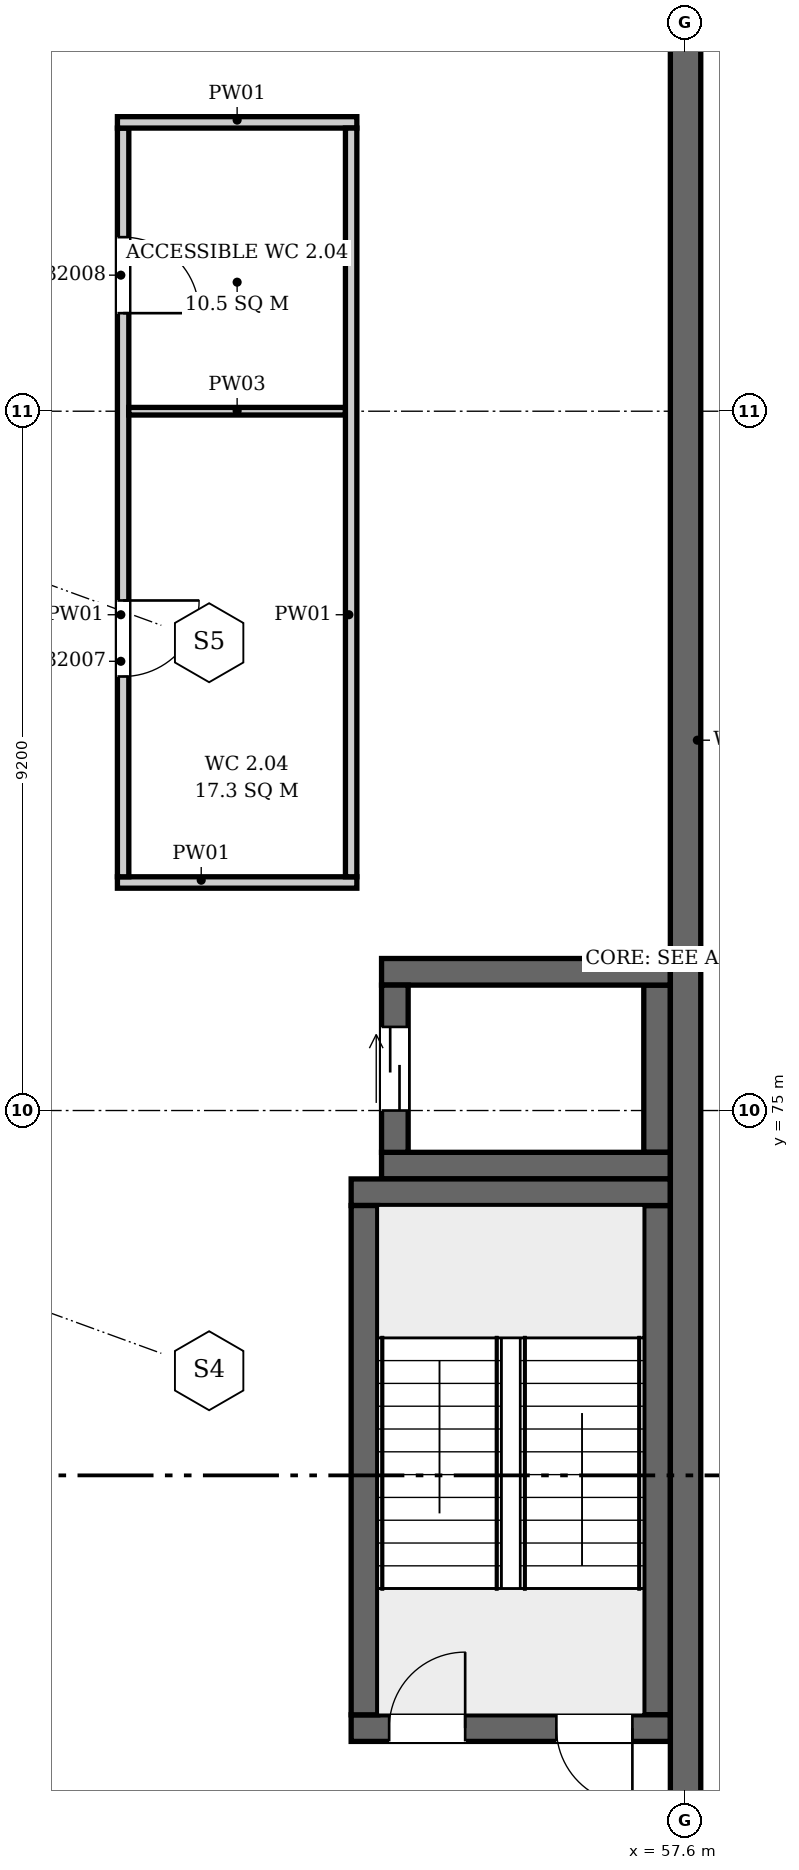
"""IFC4 building model, lengths in metres.
Left out: names, types, materials, properties, quantities, classifications, styles, units other than length and angle.
Written with IfcOpenShell. Run it as: python <this file> out.ifc"""

import sys

from ifc_helpers import new_model, si_unit, direction, frame, frame_2d, origin, place, context, subcontext, project, spatial, rectangle, extrude, element, fill, save


model = new_model("IFC4")
c1 = context("Model", 3, precision=1e-05, world=origin(), true_north=direction((0.0, 1.0)))
c2 = subcontext(c1, "Body", "Model", "MODEL_VIEW")
j1 = project(units=[si_unit("LENGTHUNIT", "METRE"), si_unit("PLANEANGLEUNIT", "RADIAN")], contexts=[c1])
p1 = place(None, origin())
s1 = spatial("IfcSite", under=j1, at=p1, CompositionType="ELEMENT")
p2 = place(p1, origin())
s2 = spatial("IfcBuilding", under=s1, at=p2, CompositionType="ELEMENT")
p3 = place(p2, frame((0.0, 0.0, 14.2)))
s3 = spatial("IfcBuildingStorey", under=s2, at=p3, CompositionType="ELEMENT", Elevation=14.2)
p4 = place(p3, frame((57.6, 46.72, 0.0), z_axis=(0.0, 0.0, 1.0), x_axis=(0.0, 1.0, 0.0)))
e1 = element("IfcWall", 1, at=p4, inside=s3, PredefinedType="SHEAR", context=c2, shape_type="SweptSolid", body=[
    extrude(rectangle(XDim=47.36, YDim=0.4, at=frame_2d((23.68, 0.0))), origin(), (0.0, 0.0, 1.0), 7.5),
])
p5 = place(p3, frame((53.2, 66.875, 0.0), z_axis=(0.0, 0.0, 1.0), x_axis=(1.0, 0.0, 0.0)))
e2 = element("IfcWall", 2, at=p5, inside=s3, PredefinedType="SHEAR", context=c2, shape_type="SweptSolid", body=[
    extrude(rectangle(XDim=4.2, YDim=0.35, at=frame_2d((2.1, 0.0))), origin(), (0.0, 0.0, 1.0), 7.5),
])
p6 = place(p5, frame((0.5, 0.0, 0.0)))
e3 = element("IfcOpeningElement", 3, at=p6, cuts=e2, PredefinedType="OPENING", context=c2, shape_type="SweptSolid", body=[
    extrude(rectangle(XDim=1.0, YDim=2.1, at=frame_2d((0.5, 1.05))), frame((0.0, 0.185, 0.0), z_axis=(0.0, -1.0, 0.0), x_axis=(1.0, 0.0, 0.0)), (0.0, 0.0, 1.0), 0.37),
])
p7 = place(p5, frame((2.7, 0.0, 0.0)))
e4 = element("IfcOpeningElement", 4, at=p7, cuts=e2, PredefinedType="OPENING", context=c2, shape_type="SweptSolid", body=[
    extrude(rectangle(XDim=1.0, YDim=2.1, at=frame_2d((0.5, 1.05))), frame((0.0, 0.185, 0.0), z_axis=(0.0, -1.0, 0.0), x_axis=(1.0, 0.0, 0.0)), (0.0, 0.0, 1.0), 0.37),
])
p8 = place(p3, frame((53.2, 73.925, 0.0), z_axis=(0.0, 0.0, 1.0), x_axis=(1.0, 0.0, 0.0)))
e5 = element("IfcWall", 5, at=p8, inside=s3, PredefinedType="SHEAR", context=c2, shape_type="SweptSolid", body=[
    extrude(rectangle(XDim=4.2, YDim=0.35, at=frame_2d((2.1, 0.0))), origin(), (0.0, 0.0, 1.0), 7.5),
])
for number, where, z_axis, x_axis in (
    (6, (53.375, 67.05, 0.0), (0.0, 0.0, 1.0), (0.0, 1.0, 0.0)),
    (7, (57.225, 67.05, 0.0), (0.0, 0.0, 1.0), (0.0, 1.0, 0.0)),
):
    element("IfcWall", number, at=place(p3, frame(where, z_axis=z_axis, x_axis=x_axis)), inside=s3, PredefinedType="SHEAR", context=c2, shape_type="SweptSolid", body=[
        extrude(rectangle(XDim=6.7, YDim=0.35, at=frame_2d((3.35, 0.0))), origin(), (0.0, 0.0, 1.0), 7.5),
    ])
for number, where, z_axis, x_axis in (
    (8, (53.6, 74.275, 0.0), (0.0, 0.0, 1.0), (1.0, 0.0, 0.0)),
    (9, (53.6, 76.825, 0.0), (0.0, 0.0, 1.0), (1.0, 0.0, 0.0)),
):
    element("IfcWall", number, at=place(p3, frame(where, z_axis=z_axis, x_axis=x_axis)), inside=s3, PredefinedType="SHEAR", context=c2, shape_type="SweptSolid", body=[
        extrude(rectangle(XDim=3.8, YDim=0.35, at=frame_2d((1.9, 0.0))), origin(), (0.0, 0.0, 1.0), 7.5),
    ])
p9 = place(p3, frame((53.775, 74.45, 0.0), z_axis=(0.0, 0.0, 1.0), x_axis=(0.0, 1.0, 0.0)))
e10 = element("IfcWall", 10, at=p9, inside=s3, PredefinedType="SHEAR", context=c2, shape_type="SweptSolid", body=[
    extrude(rectangle(XDim=2.2, YDim=0.35, at=frame_2d((1.1, 0.0))), origin(), (0.0, 0.0, 1.0), 7.5),
])
p10 = place(p9, frame((0.55, 0.0, 0.0)))
e11 = element("IfcOpeningElement", 11, at=p10, cuts=e10, PredefinedType="OPENING", context=c2, shape_type="SweptSolid", body=[
    extrude(rectangle(XDim=1.1, YDim=2.1, at=frame_2d((0.55, 1.05))), frame((0.0, 0.185, 0.0), z_axis=(0.0, -1.0, 0.0), x_axis=(1.0, 0.0, 0.0)), (0.0, 0.0, 1.0), 0.37),
])
p11 = place(p3, frame((57.225, 74.45, 0.0), z_axis=(0.0, 0.0, 1.0), x_axis=(0.0, 1.0, 0.0)))
e12 = element("IfcWall", 12, at=p11, inside=s3, PredefinedType="SHEAR", context=c2, shape_type="SweptSolid", body=[
    extrude(rectangle(XDim=2.2, YDim=0.35, at=frame_2d((1.1, 0.0))), origin(), (0.0, 0.0, 1.0), 7.5),
])
p12 = place(p3, frame((50.125, 78.0, 0.0), z_axis=(0.0, 0.0, 1.0), x_axis=(1.0, 0.0, 0.0)))
e13 = element("IfcWall", 13, at=p12, inside=s3, PredefinedType="PARTITIONING", context=c2, shape_type="SweptSolid", body=[
    extrude(rectangle(XDim=3.15, YDim=0.15, at=frame_2d((1.575, 0.0))), origin(), (0.0, 0.0, 1.0), 7.15),
])
p13 = place(p3, frame((50.2, 78.075, 0.0), z_axis=(0.0, 0.0, 1.0), x_axis=(0.0, 1.0, 0.0)))
e14 = element("IfcWall", 14, at=p13, inside=s3, PredefinedType="PARTITIONING", context=c2, shape_type="SweptSolid", body=[
    extrude(rectangle(XDim=9.85, YDim=0.15, at=frame_2d((4.925, 0.0))), origin(), (0.0, 0.0, 1.0), 7.15),
])
p14 = place(p13, frame((2.635, 0.0, 0.0)))
e15 = element("IfcOpeningElement", 15, at=p14, cuts=e14, PredefinedType="OPENING", context=c2, shape_type="SweptSolid", body=[
    extrude(rectangle(XDim=1.0, YDim=2.1, at=frame_2d((0.5, 1.05))), frame((0.0, 0.085, 0.0), z_axis=(0.0, -1.0, 0.0), x_axis=(1.0, 0.0, 0.0)), (0.0, 0.0, 1.0), 0.17),
])
p15 = place(p13, frame((7.415, 0.0, 0.0)))
e16 = element("IfcOpeningElement", 16, at=p15, cuts=e14, PredefinedType="OPENING", context=c2, shape_type="SweptSolid", body=[
    extrude(rectangle(XDim=1.0, YDim=2.1, at=frame_2d((0.5, 1.05))), frame((0.0, 0.085, 0.0), z_axis=(0.0, -1.0, 0.0), x_axis=(1.0, 0.0, 0.0)), (0.0, 0.0, 1.0), 0.17),
])
p16 = place(p3, frame((50.125, 88.0, 0.0), z_axis=(0.0, 0.0, 1.0), x_axis=(1.0, 0.0, 0.0)))
e17 = element("IfcWall", 17, at=p16, inside=s3, PredefinedType="PARTITIONING", context=c2, shape_type="SweptSolid", body=[
    extrude(rectangle(XDim=3.15, YDim=0.15, at=frame_2d((1.575, 0.0))), origin(), (0.0, 0.0, 1.0), 7.15),
])
p17 = place(p3, frame((50.275, 84.2, 0.0), z_axis=(0.0, 0.0, 1.0), x_axis=(1.0, 0.0, 0.0)))
e18 = element("IfcWall", 18, at=p17, inside=s3, PredefinedType="PARTITIONING", context=c2, shape_type="SweptSolid", body=[
    extrude(rectangle(XDim=2.85, YDim=0.1, at=frame_2d((1.425, 0.0))), origin(), (0.0, 0.0, 1.0), 6.75),
])
p18 = place(p3, frame((53.2, 78.075, 0.0), z_axis=(0.0, 0.0, 1.0), x_axis=(0.0, 1.0, 0.0)))
e19 = element("IfcWall", 19, at=p18, inside=s3, PredefinedType="PARTITIONING", context=c2, shape_type="SweptSolid", body=[
    extrude(rectangle(XDim=9.85, YDim=0.15, at=frame_2d((4.925, 0.0))), origin(), (0.0, 0.0, 1.0), 7.15),
])
p19 = place(p6, origin())
e20 = element("IfcDoor", 20, at=p19, inside=s3, OperationType="SINGLE_SWING_RIGHT", PredefinedType="DOOR", context=c2, shape_type="SweptSolid", body=[
    extrude(rectangle(XDim=1.0, YDim=2.1, at=frame_2d((0.5, 1.05))), frame((0.0, 0.025, 0.0), z_axis=(0.0, -1.0, 0.0), x_axis=(1.0, 0.0, 0.0)), (0.0, 0.0, 1.0), 0.05),
])
fill(e3, e20)
p20 = place(p7, origin())
e21 = element("IfcDoor", 21, at=p20, inside=s3, OperationType="SINGLE_SWING_LEFT", PredefinedType="DOOR", context=c2, shape_type="SweptSolid", body=[
    extrude(rectangle(XDim=1.0, YDim=2.1, at=frame_2d((0.5, 1.05))), frame((0.0, 0.025, 0.0), z_axis=(0.0, -1.0, 0.0), x_axis=(1.0, 0.0, 0.0)), (0.0, 0.0, 1.0), 0.05),
])
fill(e4, e21)
p21 = place(p10, origin())
e22 = element("IfcDoor", 22, at=p21, inside=s3, OperationType="DOUBLE_DOOR_SLIDING", PredefinedType="DOOR", context=c2, shape_type="SweptSolid", body=[
    extrude(rectangle(XDim=1.1, YDim=2.1, at=frame_2d((0.55, 1.05))), frame((0.0, 0.025, 0.0), z_axis=(0.0, -1.0, 0.0), x_axis=(1.0, 0.0, 0.0)), (0.0, 0.0, 1.0), 0.05),
])
fill(e11, e22)
p22 = place(p14, origin())
e23 = element("IfcDoor", 23, at=p22, inside=s3, OperationType="SINGLE_SWING_RIGHT", PredefinedType="DOOR", context=c2, shape_type="SweptSolid", body=[
    extrude(rectangle(XDim=1.0, YDim=2.1, at=frame_2d((0.5, 1.05))), frame((0.0, 0.025, 0.0), z_axis=(0.0, -1.0, 0.0), x_axis=(1.0, 0.0, 0.0)), (0.0, 0.0, 1.0), 0.05),
])
fill(e15, e23)
p23 = place(p15, origin())
e24 = element("IfcDoor", 24, at=p23, inside=s3, OperationType="SINGLE_SWING_LEFT", PredefinedType="DOOR", context=c2, shape_type="SweptSolid", body=[
    extrude(rectangle(XDim=1.0, YDim=2.1, at=frame_2d((0.5, 1.05))), frame((0.0, 0.025, 0.0), z_axis=(0.0, -1.0, 0.0), x_axis=(1.0, 0.0, 0.0)), (0.0, 0.0, 1.0), 0.05),
])
fill(e16, e24)
save(model, sys.argv[1])
